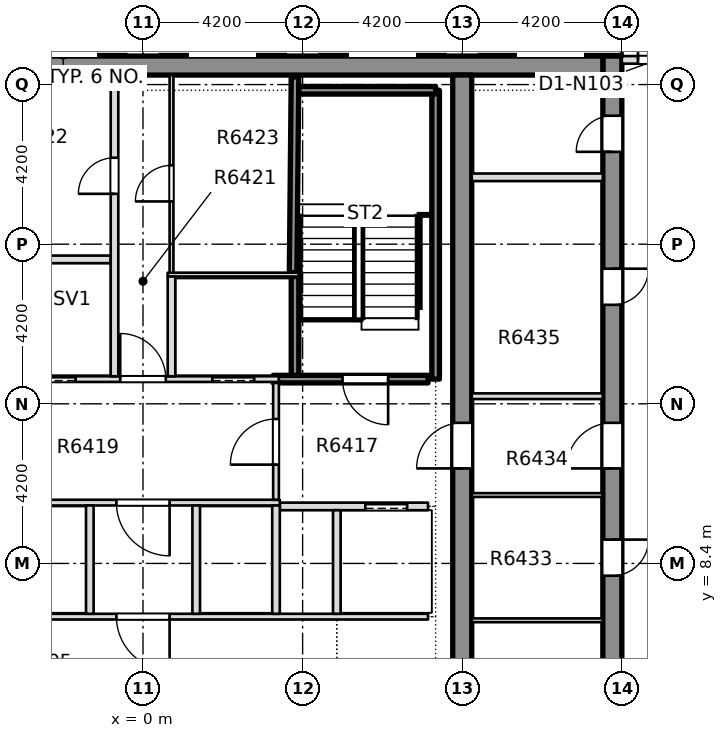
"""IFC4 building model, lengths in metres.
Left out: names, types, materials, properties, quantities, classifications, styles, units other than length and angle.
Written with IfcOpenShell. Run it as: python <this file> out.ifc"""

import sys

from ifc_helpers import new_model, si_unit, direction, frame, frame_2d, origin, place, context, subcontext, project, spatial, rectangle, extrude, element, fill, save


model = new_model("IFC4")
c1 = context("Model", 3, precision=1e-05, world=origin(), true_north=direction((0.0, 1.0)))
c2 = subcontext(c1, "Body", "Model", "MODEL_VIEW")
j1 = project(units=[si_unit("LENGTHUNIT", "METRE"), si_unit("PLANEANGLEUNIT", "RADIAN")], contexts=[c1])
p1 = place(None, origin())
s1 = spatial("IfcSite", under=j1, at=p1, CompositionType="ELEMENT")
p2 = place(p1, origin())
s2 = spatial("IfcBuilding", under=s1, at=p2, CompositionType="ELEMENT")
p3 = place(p2, frame((0.0, 0.0, 244.15)))
s3 = spatial("IfcBuildingStorey", under=s2, at=p3, CompositionType="ELEMENT", Elevation=244.15)
p4 = place(p3, frame((12.35, -8.4, -0.4), z_axis=(0.0, 0.0, 1.0), x_axis=(0.0, 1.0, 0.0)))
e1 = element("IfcWall", 1, at=p4, inside=s3, PredefinedType="SHEAR", context=c2, shape_type="SweptSolid", body=[
    extrude(rectangle(XDim=30.15, YDim=0.5, at=frame_2d((15.075, 0.0))), origin(), (0.0, 0.0, 1.0), 3.45),
])
p5 = place(p4, frame((3.416, 0.0, 0.4)))
e2 = element("IfcOpeningElement", 2, at=p5, cuts=e1, PredefinedType="OPENING", context=c2, shape_type="SweptSolid", body=[
    extrude(rectangle(XDim=0.95, YDim=2.1, at=frame_2d((0.475, 1.05))), frame((0.0, 0.26, 0.0), z_axis=(0.0, -1.0, 0.0), x_axis=(1.0, 0.0, 0.0)), (0.0, 0.0, 1.0), 0.52),
])
p6 = place(p4, frame((7.932, 0.0, 0.4)))
e3 = element("IfcOpeningElement", 3, at=p6, cuts=e1, PredefinedType="OPENING", context=c2, shape_type="SweptSolid", body=[
    extrude(rectangle(XDim=0.95, YDim=2.1, at=frame_2d((0.475, 1.05))), frame((0.0, 0.26, 0.0), z_axis=(0.0, -1.0, 0.0), x_axis=(1.0, 0.0, 0.0)), (0.0, 0.0, 1.0), 0.52),
])
p7 = place(p4, frame((12.144, 0.0, 0.4)))
e4 = element("IfcOpeningElement", 4, at=p7, cuts=e1, PredefinedType="OPENING", context=c2, shape_type="SweptSolid", body=[
    extrude(rectangle(XDim=0.95, YDim=2.1, at=frame_2d((0.475, 1.05))), frame((0.0, 0.26, 0.0), z_axis=(0.0, -1.0, 0.0), x_axis=(1.0, 0.0, 0.0)), (0.0, 0.0, 1.0), 0.52),
])
p8 = place(p4, frame((16.477, 0.0, 0.4)))
e5 = element("IfcOpeningElement", 5, at=p8, cuts=e1, PredefinedType="OPENING", context=c2, shape_type="SweptSolid", body=[
    extrude(rectangle(XDim=0.95, YDim=2.1, at=frame_2d((0.475, 1.05))), frame((0.0, 0.26, 0.0), z_axis=(0.0, -1.0, 0.0), x_axis=(1.0, 0.0, 0.0)), (0.0, 0.0, 1.0), 0.52),
])
p9 = place(p4, frame((23.605, 0.0, 0.4)))
e6 = element("IfcOpeningElement", 6, at=p9, cuts=e1, PredefinedType="OPENING", context=c2, shape_type="SweptSolid", body=[
    extrude(rectangle(XDim=0.95, YDim=2.1, at=frame_2d((0.475, 1.05))), frame((0.0, 0.26, 0.0), z_axis=(0.0, -1.0, 0.0), x_axis=(1.0, 0.0, 0.0)), (0.0, 0.0, 1.0), 0.52),
])
p10 = place(p4, frame((27.63, 0.0, 0.4)))
e7 = element("IfcOpeningElement", 7, at=p10, cuts=e1, PredefinedType="OPENING", context=c2, shape_type="SweptSolid", body=[
    extrude(rectangle(XDim=0.95, YDim=2.1, at=frame_2d((0.475, 1.05))), frame((0.0, 0.26, 0.0), z_axis=(0.0, -1.0, 0.0), x_axis=(1.0, 0.0, 0.0)), (0.0, 0.0, 1.0), 0.52),
])
p11 = place(p4, frame((19.3, 0.0, 0.4)))
e8 = element("IfcOpeningElement", 8, at=p11, cuts=e1, PredefinedType="OPENING", context=c2, shape_type="SweptSolid", body=[
    extrude(rectangle(XDim=1.2, YDim=2.1, at=frame_2d((0.6, 1.05))), frame((0.0, 0.26, 0.0), z_axis=(0.0, -1.0, 0.0), x_axis=(1.0, 0.0, 0.0)), (0.0, 0.0, 1.0), 0.52),
])
p12 = place(p3, frame((-12.1, 21.5, -0.4), z_axis=(0.0, 0.0, 1.0), x_axis=(1.0, 0.0, 0.0)))
e9 = element("IfcWall", 9, at=p12, inside=s3, PredefinedType="SHEAR", context=c2, shape_type="SweptSolid", body=[
    extrude(rectangle(XDim=24.2, YDim=0.5, at=frame_2d((12.1, 0.0))), origin(), (0.0, 0.0, 1.0), 3.45),
])
p13 = place(p3, frame((8.4, -7.9, -0.4), z_axis=(0.0, 0.0, 1.0), x_axis=(0.0, 1.0, 0.0)))
e10 = element("IfcWall", 10, at=p13, inside=s3, PredefinedType="SHEAR", context=c2, shape_type="SweptSolid", body=[
    extrude(rectangle(XDim=29.15, YDim=0.5, at=frame_2d((14.575, 0.0))), origin(), (0.0, 0.0, 1.0), 3.45),
])
p14 = place(p13, frame((18.8, 0.0, 0.4)))
e11 = element("IfcOpeningElement", 11, at=p14, cuts=e10, PredefinedType="OPENING", context=c2, shape_type="SweptSolid", body=[
    extrude(rectangle(XDim=1.2, YDim=2.1, at=frame_2d((0.6, 1.05))), frame((0.0, 0.26, 0.0), z_axis=(0.0, -1.0, 0.0), x_axis=(1.0, 0.0, 0.0)), (0.0, 0.0, 1.0), 0.52),
])
p15 = place(p3, frame((16.35, 21.65, 0.0), z_axis=(0.0, 0.0, 1.0), x_axis=(-1.0, 0.0, 0.0)))
e12 = element("IfcWall", 12, at=p15, inside=s3, PredefinedType="STANDARD", context=c2, shape_type="SweptSolid", body=[
    extrude(rectangle(XDim=3.75, YDim=0.2, at=frame_2d((1.875, 0.0))), origin(), (0.0, 0.0, 1.0), 3.05),
])
p16 = place(p15, frame((2.325, 0.0, 0.0)))
e13 = element("IfcOpeningElement", 13, at=p16, cuts=e12, PredefinedType="OPENING", context=c2, shape_type="SweptSolid", body=[
    extrude(rectangle(XDim=1.0, YDim=2.4, at=frame_2d((0.5, 1.2))), frame((0.0, 0.11, 0.0), z_axis=(0.0, -1.0, 0.0), x_axis=(1.0, 0.0, 0.0)), (0.0, 0.0, 1.0), 0.22),
])
p17 = place(p3, frame((-7.5, 7.0, 0.0), z_axis=(0.0, 0.0, 1.0), x_axis=(1.0, 0.0, 0.0)))
e14 = element("IfcWall", 14, at=p17, inside=s3, PredefinedType="PARTITIONING", context=c2, shape_type="SweptSolid", body=[
    extrude(rectangle(XDim=15.0, YDim=0.15, at=frame_2d((7.5, 0.0))), origin(), (0.0, 0.0, 1.0), 3.05),
])
p18 = place(p17, frame((6.8, 0.0, 0.0)))
e15 = element("IfcOpeningElement", 15, at=p18, cuts=e14, PredefinedType="OPENING", context=c2, shape_type="SweptSolid", body=[
    extrude(rectangle(XDim=1.4, YDim=2.1, at=frame_2d((0.7, 1.05))), frame((0.0, 0.085, 0.0), z_axis=(0.0, -1.0, 0.0), x_axis=(1.0, 0.0, 0.0)), (0.0, 0.0, 1.0), 0.17),
])
p19 = place(p3, frame((3.6, 9.9, 0.0), z_axis=(0.0, 0.0, 1.0), x_axis=(1.0, 0.0, 0.0)))
e16 = element("IfcWall", 16, at=p19, inside=s3, PredefinedType="PARTITIONING", context=c2, shape_type="SweptSolid", body=[
    extrude(rectangle(XDim=3.9, YDim=0.2, at=frame_2d((1.95, 0.0))), origin(), (0.0, 0.0, 1.0), 3.05),
])
p20 = place(p19, frame((2.25, 0.0, 0.0)))
e17 = element("IfcOpeningElement", 17, at=p20, cuts=e16, PredefinedType="OPENING", context=c2, shape_type="SweptSolid", body=[
    extrude(rectangle(XDim=1.1, YDim=2.1, at=frame_2d((0.55, 1.05))), frame((0.0, 0.11, 0.0), z_axis=(0.0, -1.0, 0.0), x_axis=(1.0, 0.0, 0.0)), (0.0, 0.0, 1.0), 0.22),
])
p21 = place(p3, frame((-3.6, 10.0, 0.0), z_axis=(0.0, 0.0, 1.0), x_axis=(1.0, 0.0, 0.0)))
e18 = element("IfcWall", 18, at=p21, inside=s3, PredefinedType="PARTITIONING", context=c2, shape_type="SweptSolid", body=[
    extrude(rectangle(XDim=7.2, YDim=0.15, at=frame_2d((3.6, 0.0))), origin(), (0.0, 0.0, 1.0), 3.05),
])
p22 = place(p21, frame((2.9, 0.0, 0.0)))
e19 = element("IfcOpeningElement", 19, at=p22, cuts=e18, PredefinedType="OPENING", context=c2, shape_type="SweptSolid", body=[
    extrude(rectangle(XDim=1.4, YDim=2.1, at=frame_2d((0.7, 1.05))), frame((0.0, 0.085, 0.0), z_axis=(0.0, -1.0, 0.0), x_axis=(1.0, 0.0, 0.0)), (0.0, 0.0, 1.0), 0.17),
])
p23 = place(p3, frame((-3.575, 13.25, 0.0), z_axis=(0.0, 0.0, 1.0), x_axis=(1.0, 0.0, 0.0)))
e20 = element("IfcWall", 20, at=p23, inside=s3, PredefinedType="PARTITIONING", context=c2, shape_type="SweptSolid", body=[
    extrude(rectangle(XDim=7.15, YDim=0.15, at=frame_2d((3.575, 0.0))), origin(), (0.0, 0.0, 1.0), 3.05),
])
p24 = place(p23, frame((0.6, 0.0, 0.0)))
e21 = element("IfcOpeningElement", 21, at=p24, cuts=e20, PredefinedType="OPENING", context=c2, shape_type="SweptSolid", body=[
    extrude(rectangle(XDim=1.2, YDim=2.1, at=frame_2d((0.6, 1.05))), frame((0.0, 0.085, 0.0), z_axis=(0.0, -1.0, 0.0), x_axis=(1.0, 0.0, 0.0)), (0.0, 0.0, 1.0), 0.17),
])
p25 = place(p23, frame((5.4, 0.0, 0.0)))
e22 = element("IfcOpeningElement", 22, at=p25, cuts=e20, PredefinedType="OPENING", context=c2, shape_type="SweptSolid", body=[
    extrude(rectangle(XDim=1.1, YDim=2.1, at=frame_2d((0.55, 1.05))), frame((0.0, 0.085, 0.0), z_axis=(0.0, -1.0, 0.0), x_axis=(1.0, 0.0, 0.0)), (0.0, 0.0, 1.0), 0.17),
])
p26 = place(p23, frame((2.975, 0.0, 0.0)))
e23 = element("IfcOpeningElement", 23, at=p26, cuts=e20, PredefinedType="OPENING", context=c2, shape_type="SweptSolid", body=[
    extrude(rectangle(XDim=1.2, YDim=2.1, at=frame_2d((0.6, 1.05))), frame((0.0, 0.085, 0.0), z_axis=(0.0, -1.0, 0.0), x_axis=(1.0, 0.0, 0.0)), (0.0, 0.0, 1.0), 0.17),
])
p27 = place(p3, frame((3.425, 13.25, 0.0), z_axis=(0.0, 0.0, 1.0), x_axis=(1.0, 0.0, 0.0)))
e24 = element("IfcWall", 24, at=p27, inside=s3, PredefinedType="SOLIDWALL", context=c2, shape_type="SweptSolid", body=[
    extrude(rectangle(XDim=4.075, YDim=0.2, at=frame_2d((2.038, 0.0))), origin(), (0.0, 0.0, 1.0), 3.05),
])
p28 = place(p27, frame((1.825, 0.0, 0.0)))
e25 = element("IfcOpeningElement", 25, at=p28, cuts=e24, PredefinedType="OPENING", context=c2, shape_type="SweptSolid", body=[
    extrude(rectangle(XDim=1.2, YDim=2.1, at=frame_2d((0.6, 1.05))), frame((0.0, 0.11, 0.0), z_axis=(0.0, -1.0, 0.0), x_axis=(1.0, 0.0, 0.0)), (0.0, 0.0, 1.0), 0.22),
])
p29 = place(p3, frame((0.65, 16.0, 0.0), z_axis=(0.0, 0.0, 1.0), x_axis=(1.0, 0.0, 0.0)))
e26 = element("IfcWall", 26, at=p29, inside=s3, PredefinedType="PARTITIONING", context=c2, shape_type="SweptSolid", body=[
    extrude(rectangle(XDim=3.45, YDim=0.1, at=frame_2d((1.725, 0.0))), origin(), (0.0, 0.0, 1.0), 3.05),
])
p30 = place(p3, frame((-3.9, 16.4, 0.0), z_axis=(0.0, 0.0, 1.0), x_axis=(1.0, 0.0, 0.0)))
e27 = element("IfcWall", 27, at=p30, inside=s3, PredefinedType="PARTITIONING", context=c2, shape_type="SweptSolid", body=[
    extrude(rectangle(XDim=3.05, YDim=0.2, at=frame_2d((1.525, 0.0))), origin(), (0.0, 0.0, 1.0), 3.05),
])
p31 = place(p3, frame((-1.4, 7.075, 0.0), z_axis=(0.0, 0.0, 1.0), x_axis=(0.0, 1.0, 0.0)))
e28 = element("IfcWall", 28, at=p31, inside=s3, PredefinedType="PARTITIONING", context=c2, shape_type="SweptSolid", body=[
    extrude(rectangle(XDim=2.85, YDim=0.2, at=frame_2d((1.425, 0.0))), origin(), (0.0, 0.0, 1.0), 3.05),
])
p32 = place(p3, frame((-0.75, 13.325, 0.0), z_axis=(0.0, 0.0, 1.0), x_axis=(0.0, 1.0, 0.0)))
e29 = element("IfcWall", 29, at=p32, inside=s3, PredefinedType="PARTITIONING", context=c2, shape_type="SweptSolid", body=[
    extrude(rectangle(XDim=7.924, YDim=0.2, at=frame_2d((3.962, 0.0))), origin(), (0.0, 0.0, 1.0), 3.05),
])
p33 = place(p32, frame((4.8, 0.0, 0.0)))
e30 = element("IfcOpeningElement", 30, at=p33, cuts=e29, PredefinedType="OPENING", context=c2, shape_type="SweptSolid", body=[
    extrude(rectangle(XDim=0.95, YDim=2.1, at=frame_2d((0.475, 1.05))), frame((0.0, 0.11, 0.0), z_axis=(0.0, -1.0, 0.0), x_axis=(1.0, 0.0, 0.0)), (0.0, 0.0, 1.0), 0.22),
])
p34 = place(p3, frame((0.75, 13.325, 0.0), z_axis=(0.0, 0.0, 1.0), x_axis=(0.0, 1.0, 0.0)))
e31 = element("IfcWall", 31, at=p34, inside=s3, PredefinedType="PARTITIONING", context=c2, shape_type="SweptSolid", body=[
    extrude(rectangle(XDim=2.625, YDim=0.2, at=frame_2d((1.312, 0.0))), origin(), (0.0, 0.0, 1.0), 3.05),
])
p35 = place(p3, frame((0.75, 16.05, 0.0), z_axis=(0.0, 0.0, 1.0), x_axis=(0.0, 1.0, 0.0)))
e32 = element("IfcWall", 32, at=p35, inside=s3, PredefinedType="PARTITIONING", context=c2, shape_type="SweptSolid", body=[
    extrude(rectangle(XDim=5.199, YDim=0.1, at=frame_2d((2.6, 0.0))), origin(), (0.0, 0.0, 1.0), 3.05),
])
p36 = place(p35, frame((1.875, 0.0, 0.0)))
e33 = element("IfcOpeningElement", 33, at=p36, cuts=e32, PredefinedType="OPENING", context=c2, shape_type="SweptSolid", body=[
    extrude(rectangle(XDim=0.95, YDim=2.1, at=frame_2d((0.475, 1.05))), frame((0.0, 0.06, 0.0), z_axis=(0.0, -1.0, 0.0), x_axis=(1.0, 0.0, 0.0)), (0.0, 0.0, 1.0), 0.12),
])
for number, where, z_axis, x_axis in (
    (34, (1.4, 7.075, 0.0), (0.0, 0.0, 1.0), (0.0, 1.0, 0.0)),
    (35, (3.5, 7.075, 0.0), (0.0, 0.0, 1.0), (0.0, 1.0, 0.0)),
):
    element("IfcWall", number, at=place(p3, frame(where, z_axis=z_axis, x_axis=x_axis)), inside=s3, PredefinedType="PARTITIONING", context=c2, shape_type="SweptSolid", body=[
        extrude(rectangle(XDim=2.85, YDim=0.2, at=frame_2d((1.425, 0.0))), origin(), (0.0, 0.0, 1.0), 3.05),
    ])
p37 = place(p3, frame((3.5, 10.075, 0.0), z_axis=(0.0, 0.0, 1.0), x_axis=(0.0, 1.0, 0.0)))
e36 = element("IfcWall", 36, at=p37, inside=s3, PredefinedType="PARTITIONING", context=c2, shape_type="SweptSolid", body=[
    extrude(rectangle(XDim=3.075, YDim=0.15, at=frame_2d((1.538, 0.0))), origin(), (0.0, 0.0, 1.0), 3.05),
])
p38 = place(p37, frame((0.925, 0.0, 0.0)))
e37 = element("IfcOpeningElement", 37, at=p38, cuts=e36, PredefinedType="OPENING", context=c2, shape_type="SweptSolid", body=[
    extrude(rectangle(XDim=1.2, YDim=2.1, at=frame_2d((0.6, 1.05))), frame((0.0, 0.085, 0.0), z_axis=(0.0, -1.0, 0.0), x_axis=(1.0, 0.0, 0.0)), (0.0, 0.0, 1.0), 0.17),
])
p39 = place(p3, frame((4.0, 13.35, 0.0), z_axis=(0.0, 0.0, 1.0), x_axis=(0.0, 1.0, 0.0)))
e38 = element("IfcWall", 38, at=p39, inside=s3, PredefinedType="SOLIDWALL", context=c2, shape_type="SweptSolid", body=[
    extrude(rectangle(XDim=2.6, YDim=0.2, at=frame_2d((1.3, 0.0))), origin(), (0.0, 0.0, 1.0), 3.05),
])
p40 = place(p3, frame((3.95, 16.05, 0.0), z_axis=(0.0, 0.0, 1.0), x_axis=(0.009719787395, 0.999952761751, 0.0)))
e39 = element("IfcWall", 39, at=p40, inside=s3, PredefinedType="SOLIDWALL", context=c2, shape_type="SweptSolid", body=[
    extrude(rectangle(XDim=5.149, YDim=0.2, at=frame_2d((2.575, 0.0))), origin(), (0.0, 0.0, 1.0), 3.05),
])
p41 = place(p3, frame((5.1, 7.075, 0.0), z_axis=(0.0, 0.0, 1.0), x_axis=(0.0, 1.0, 0.0)))
e40 = element("IfcWall", 40, at=p41, inside=s3, PredefinedType="PARTITIONING", context=c2, shape_type="SweptSolid", body=[
    extrude(rectangle(XDim=2.725, YDim=0.2, at=frame_2d((1.363, 0.0))), origin(), (0.0, 0.0, 1.0), 3.05),
])
for number, where, z_axis, x_axis in (
    (41, (8.651, 6.904, 0.0), (0.0, 0.0, 1.0), (1.0, 0.0, 0.0)),
    (42, (8.651, 10.2, 0.0), (0.0, 0.0, 1.0), (1.0, 0.0, 0.0)),
):
    element("IfcWall", number, at=place(p3, frame(where, z_axis=z_axis, x_axis=x_axis)), inside=s3, PredefinedType="PARTITIONING", context=c2, shape_type="SweptSolid", body=[
        extrude(rectangle(XDim=3.448, YDim=0.1, at=frame_2d((1.724, 0.0))), origin(), (0.0, 0.0, 1.0), 3.05),
    ])
p42 = place(p3, frame((8.651, 12.8, 0.0), z_axis=(0.0, 0.0, 1.0), x_axis=(1.0, 0.0, 0.0)))
e43 = element("IfcWall", 43, at=p42, inside=s3, PredefinedType="PARTITIONING", context=c2, shape_type="SweptSolid", body=[
    extrude(rectangle(XDim=3.448, YDim=0.15, at=frame_2d((1.724, 0.0))), origin(), (0.0, 0.0, 1.0), 3.05),
])
p43 = place(p3, frame((8.651, 18.56, 0.0), z_axis=(0.0, 0.0, 1.0), x_axis=(1.0, 0.0, 0.0)))
e44 = element("IfcWall", 44, at=p43, inside=s3, PredefinedType="PARTITIONING", context=c2, shape_type="SweptSolid", body=[
    extrude(rectangle(XDim=3.448, YDim=0.2, at=frame_2d((1.724, 0.0))), origin(), (0.0, 0.0, 1.0), 3.05),
])
p44 = place(p3, frame((7.7, 13.25, 0.0), z_axis=(0.0, 0.0, 1.0), x_axis=(0.0, 1.0, 0.0)))
e45 = element("IfcWall", 45, at=p44, inside=s3, PredefinedType="SOLIDWALL", context=c2, shape_type="SweptSolid", body=[
    extrude(rectangle(XDim=7.6, YDim=0.2, at=frame_2d((3.8, 0.0))), origin(), (0.0, 0.0, 1.0), 3.05),
])
p45 = place(p3, frame((4.1, 20.85, 0.0), z_axis=(0.0, 0.0, 1.0), x_axis=(1.0, 0.0, 0.0)))
e46 = element("IfcWall", 46, at=p45, inside=s3, PredefinedType="SOLIDWALL", context=c2, shape_type="SweptSolid", body=[
    extrude(rectangle(XDim=3.6, YDim=0.2, at=frame_2d((1.8, 0.0))), origin(), (0.0, 0.0, 1.0), 3.05),
])
p46 = place(p16, origin())
e47 = element("IfcDoor", 47, at=p46, inside=s3, OperationType="SINGLE_SWING_LEFT", PredefinedType="DOOR", context=c2, shape_type="SweptSolid", body=[
    extrude(rectangle(XDim=1.0, YDim=2.4, at=frame_2d((0.5, 1.2))), frame((0.0, 0.025, 0.0), z_axis=(0.0, -1.0, 0.0), x_axis=(1.0, 0.0, 0.0)), (0.0, 0.0, 1.0), 0.05),
])
fill(e13, e47)
p47 = place(p28, origin())
e48 = element("IfcDoor", 48, at=p47, inside=s3, OperationType="SINGLE_SWING_RIGHT", PredefinedType="DOOR", context=c2, shape_type="SweptSolid", body=[
    extrude(rectangle(XDim=1.2, YDim=2.1, at=frame_2d((0.6, 1.05))), frame((0.0, 0.025, 0.0), z_axis=(0.0, -1.0, 0.0), x_axis=(1.0, 0.0, 0.0)), (0.0, 0.0, 1.0), 0.05),
])
fill(e25, e48)
p48 = place(p20, origin())
e49 = element("IfcDoor", 49, at=p48, inside=s3, OperationType="SLIDING_TO_LEFT", PredefinedType="DOOR", context=c2, shape_type="SweptSolid", body=[
    extrude(rectangle(XDim=1.1, YDim=2.1, at=frame_2d((0.55, 1.05))), frame((0.0, 0.025, 0.0), z_axis=(0.0, -1.0, 0.0), x_axis=(1.0, 0.0, 0.0)), (0.0, 0.0, 1.0), 0.05),
])
fill(e17, e49)
p49 = place(p18, origin())
e50 = element("IfcDoor", 50, at=p49, inside=s3, OperationType="SINGLE_SWING_RIGHT", PredefinedType="DOOR", context=c2, shape_type="SweptSolid", body=[
    extrude(rectangle(XDim=1.4, YDim=2.1, at=frame_2d((0.7, 1.05))), frame((0.0, 0.025, 0.0), z_axis=(0.0, -1.0, 0.0), x_axis=(1.0, 0.0, 0.0)), (0.0, 0.0, 1.0), 0.05),
])
fill(e15, e50)
p50 = place(p22, origin())
e51 = element("IfcDoor", 51, at=p50, inside=s3, OperationType="SINGLE_SWING_RIGHT", PredefinedType="DOOR", context=c2, shape_type="SweptSolid", body=[
    extrude(rectangle(XDim=1.4, YDim=2.1, at=frame_2d((0.7, 1.05))), frame((0.0, 0.025, 0.0), z_axis=(0.0, -1.0, 0.0), x_axis=(1.0, 0.0, 0.0)), (0.0, 0.0, 1.0), 0.05),
])
fill(e19, e51)
p51 = place(p24, origin())
e52 = element("IfcDoor", 52, at=p51, inside=s3, OperationType="SLIDING_TO_RIGHT", PredefinedType="DOOR", context=c2, shape_type="SweptSolid", body=[
    extrude(rectangle(XDim=1.2, YDim=2.1, at=frame_2d((0.6, 1.05))), frame((0.0, 0.025, 0.0), z_axis=(0.0, -1.0, 0.0), x_axis=(1.0, 0.0, 0.0)), (0.0, 0.0, 1.0), 0.05),
])
fill(e21, e52)
p52 = place(p25, origin())
e53 = element("IfcDoor", 53, at=p52, inside=s3, OperationType="SLIDING_TO_LEFT", PredefinedType="DOOR", context=c2, shape_type="SweptSolid", body=[
    extrude(rectangle(XDim=1.1, YDim=2.1, at=frame_2d((0.55, 1.05))), frame((0.0, 0.025, 0.0), z_axis=(0.0, -1.0, 0.0), x_axis=(1.0, 0.0, 0.0)), (0.0, 0.0, 1.0), 0.05),
])
fill(e22, e53)
p53 = place(p26, origin())
e54 = element("IfcDoor", 54, at=p53, inside=s3, OperationType="SINGLE_SWING_RIGHT", PredefinedType="DOOR", context=c2, shape_type="SweptSolid", body=[
    extrude(rectangle(XDim=1.2, YDim=2.1, at=frame_2d((0.6, 1.05))), frame((0.0, 0.025, 0.0), z_axis=(0.0, -1.0, 0.0), x_axis=(1.0, 0.0, 0.0)), (0.0, 0.0, 1.0), 0.05),
])
fill(e23, e54)
p54 = place(p33, origin())
e55 = element("IfcDoor", 55, at=p54, inside=s3, OperationType="SINGLE_SWING_RIGHT", PredefinedType="DOOR", context=c2, shape_type="SweptSolid", body=[
    extrude(rectangle(XDim=0.95, YDim=2.1, at=frame_2d((0.475, 1.05))), frame((0.0, 0.025, 0.0), z_axis=(0.0, -1.0, 0.0), x_axis=(1.0, 0.0, 0.0)), (0.0, 0.0, 1.0), 0.05),
])
fill(e30, e55)
p55 = place(p36, origin())
e56 = element("IfcDoor", 56, at=p55, inside=s3, OperationType="SINGLE_SWING_LEFT", PredefinedType="DOOR", context=c2, shape_type="SweptSolid", body=[
    extrude(rectangle(XDim=0.95, YDim=2.1, at=frame_2d((0.475, 1.05))), frame((0.0, 0.025, 0.0), z_axis=(0.0, -1.0, 0.0), x_axis=(1.0, 0.0, 0.0)), (0.0, 0.0, 1.0), 0.05),
])
fill(e33, e56)
p56 = place(p38, origin())
e57 = element("IfcDoor", 57, at=p56, inside=s3, OperationType="SINGLE_SWING_LEFT", PredefinedType="DOOR", context=c2, shape_type="SweptSolid", body=[
    extrude(rectangle(XDim=1.2, YDim=2.1, at=frame_2d((0.6, 1.05))), frame((0.0, 0.025, 0.0), z_axis=(0.0, -1.0, 0.0), x_axis=(1.0, 0.0, 0.0)), (0.0, 0.0, 1.0), 0.05),
])
fill(e37, e57)
p57 = place(p8, origin())
e58 = element("IfcDoor", 58, at=p57, inside=s3, OperationType="SINGLE_SWING_LEFT", PredefinedType="DOOR", context=c2, shape_type="SweptSolid", body=[
    extrude(rectangle(XDim=0.95, YDim=2.1, at=frame_2d((0.475, 1.05))), frame((0.0, 0.025, 0.0), z_axis=(0.0, -1.0, 0.0), x_axis=(1.0, 0.0, 0.0)), (0.0, 0.0, 1.0), 0.05),
])
fill(e5, e58)
p58 = place(p9, origin())
e59 = element("IfcDoor", 59, at=p58, inside=s3, OperationType="SINGLE_SWING_LEFT", PredefinedType="DOOR", context=c2, shape_type="SweptSolid", body=[
    extrude(rectangle(XDim=0.95, YDim=2.1, at=frame_2d((0.475, 1.05))), frame((0.0, 0.025, 0.0), z_axis=(0.0, -1.0, 0.0), x_axis=(1.0, 0.0, 0.0)), (0.0, 0.0, 1.0), 0.05),
])
fill(e6, e59)
p59 = place(p10, origin())
e60 = element("IfcDoor", 60, at=p59, inside=s3, OperationType="SINGLE_SWING_LEFT", PredefinedType="DOOR", context=c2, shape_type="SweptSolid", body=[
    extrude(rectangle(XDim=0.95, YDim=2.1, at=frame_2d((0.475, 1.05))), frame((0.0, 0.025, 0.0), z_axis=(0.0, -1.0, 0.0), x_axis=(1.0, 0.0, 0.0)), (0.0, 0.0, 1.0), 0.05),
])
fill(e7, e60)
p60 = place(p11, origin())
e61 = element("IfcDoor", 61, at=p60, inside=s3, OperationType="SINGLE_SWING_LEFT", PredefinedType="DOOR", context=c2, shape_type="SweptSolid", body=[
    extrude(rectangle(XDim=1.2, YDim=2.1, at=frame_2d((0.6, 1.05))), frame((0.0, 0.025, 0.0), z_axis=(0.0, -1.0, 0.0), x_axis=(1.0, 0.0, 0.0)), (0.0, 0.0, 1.0), 0.05),
])
fill(e8, e61)
p61 = place(p14, origin())
e62 = element("IfcDoor", 62, at=p61, inside=s3, OperationType="SINGLE_SWING_LEFT", PredefinedType="DOOR", context=c2, shape_type="SweptSolid", body=[
    extrude(rectangle(XDim=1.2, YDim=2.1, at=frame_2d((0.6, 1.05))), frame((0.0, 0.025, 0.0), z_axis=(0.0, -1.0, 0.0), x_axis=(1.0, 0.0, 0.0)), (0.0, 0.0, 1.0), 0.05),
])
fill(e11, e62)
save(model, sys.argv[1])
